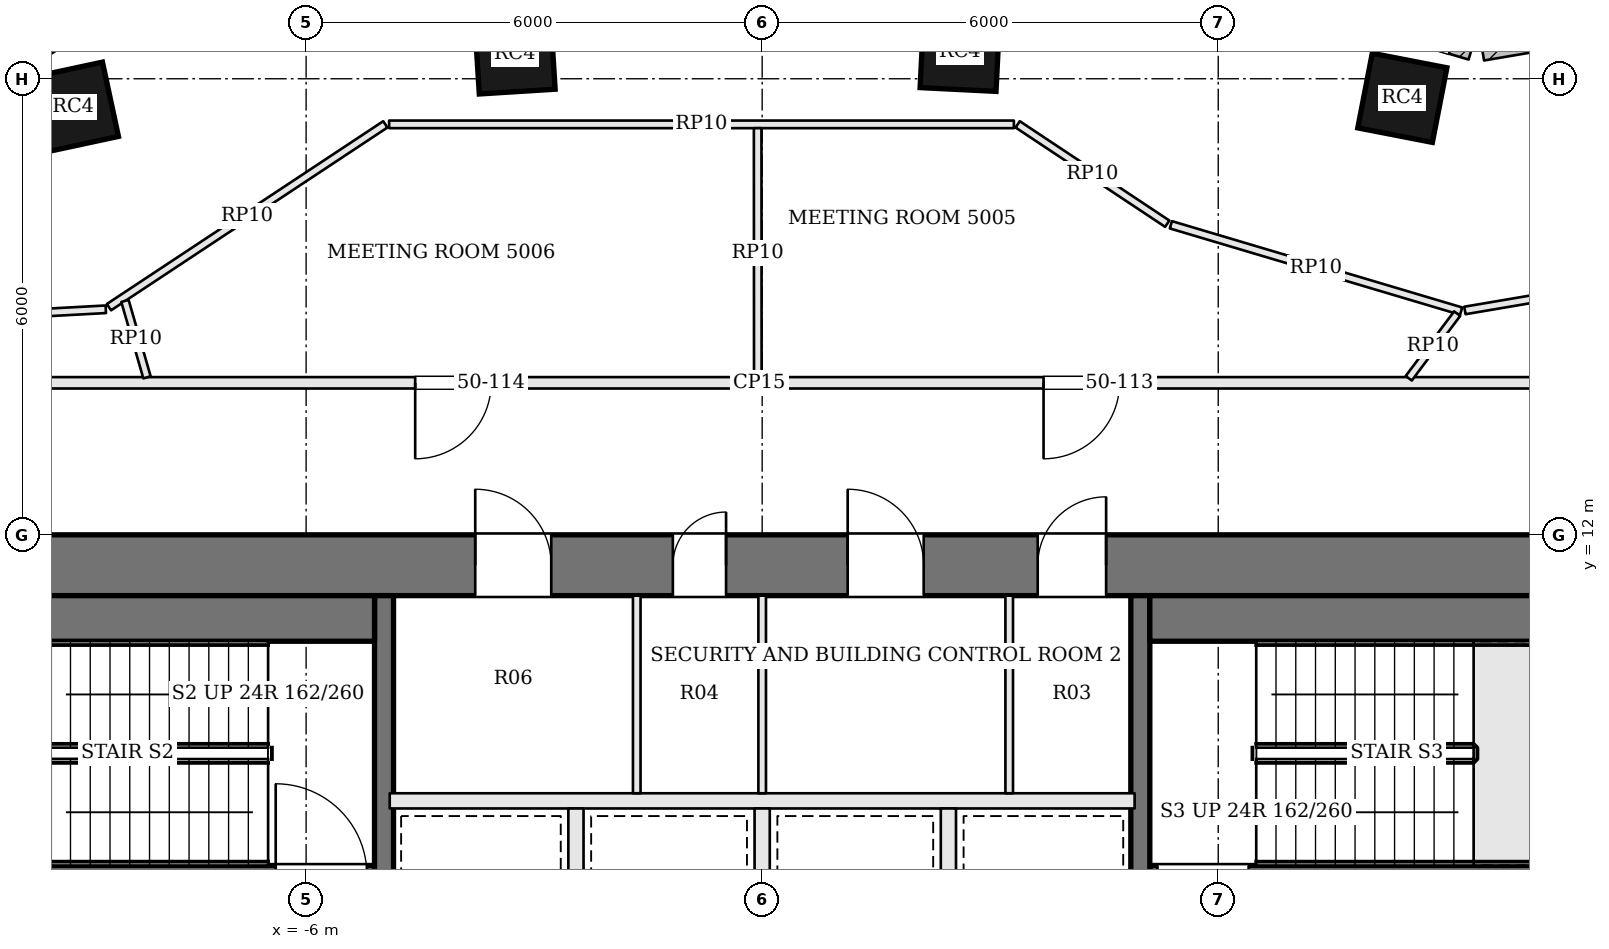
"""IFC4 building model, lengths in metres.
Left out: names, types, materials, properties, quantities, classifications, styles, units other than length and angle.
Written with IfcOpenShell. Run it as: python <this file> out.ifc"""

import sys

from ifc_helpers import new_model, si_unit, direction, frame, frame_2d, origin, origin_2d, place, context, subcontext, project, spatial, rectangle, extrude, element, fill, save


model = new_model("IFC4")
c1 = context("Model", 3, precision=1e-05, world=origin(), true_north=direction((0.0, 1.0)))
c2 = subcontext(c1, "Body", "Model", "MODEL_VIEW")
j1 = project(units=[si_unit("LENGTHUNIT", "METRE"), si_unit("PLANEANGLEUNIT", "RADIAN")], contexts=[c1])
p1 = place(None, origin())
s1 = spatial("IfcSite", under=j1, at=p1, CompositionType="ELEMENT")
p2 = place(p1, origin())
s2 = spatial("IfcBuilding", under=s1, at=p2, CompositionType="ELEMENT")
p3 = place(p2, frame((0.0, 0.0, 205.2)))
s3 = spatial("IfcBuildingStorey", under=s2, at=p3, CompositionType="ELEMENT", Elevation=205.2)
p4 = place(p3, frame((-13.0, 11.6, 0.0), z_axis=(0.0, 0.0, 1.0), x_axis=(1.0, 0.0, 0.0)))
e1 = element("IfcWall", 1, at=p4, inside=s3, PredefinedType="SHEAR", context=c2, shape_type="SweptSolid", body=[
    extrude(rectangle(XDim=26.0, YDim=0.8, at=frame_2d((13.0, 0.0))), origin(), (0.0, 0.0, 1.0), 3.9),
])
p5 = place(p4, frame((9.225, 0.0, 0.0)))
e2 = element("IfcOpeningElement", 2, at=p5, cuts=e1, PredefinedType="OPENING", context=c2, shape_type="SweptSolid", body=[
    extrude(rectangle(XDim=1.0, YDim=2.1, at=frame_2d((0.5, 1.05))), frame((0.0, 0.41, 0.0), z_axis=(0.0, -1.0, 0.0), x_axis=(1.0, 0.0, 0.0)), (0.0, 0.0, 1.0), 0.82),
])
p6 = place(p4, frame((11.825, 0.0, 0.0)))
e3 = element("IfcOpeningElement", 3, at=p6, cuts=e1, PredefinedType="OPENING", context=c2, shape_type="SweptSolid", body=[
    extrude(rectangle(XDim=0.7, YDim=2.1, at=frame_2d((0.35, 1.05))), frame((0.0, 0.41, 0.0), z_axis=(0.0, -1.0, 0.0), x_axis=(1.0, 0.0, 0.0)), (0.0, 0.0, 1.0), 0.82),
])
p7 = place(p4, frame((14.125, 0.0, 0.0)))
e4 = element("IfcOpeningElement", 4, at=p7, cuts=e1, PredefinedType="OPENING", context=c2, shape_type="SweptSolid", body=[
    extrude(rectangle(XDim=1.0, YDim=2.1, at=frame_2d((0.5, 1.05))), frame((0.0, 0.41, 0.0), z_axis=(0.0, -1.0, 0.0), x_axis=(1.0, 0.0, 0.0)), (0.0, 0.0, 1.0), 0.82),
])
p8 = place(p4, frame((16.625, 0.0, 0.0)))
e5 = element("IfcOpeningElement", 5, at=p8, cuts=e1, PredefinedType="OPENING", context=c2, shape_type="SweptSolid", body=[
    extrude(rectangle(XDim=0.9, YDim=2.1, at=frame_2d((0.45, 1.05))), frame((0.0, 0.41, 0.0), z_axis=(0.0, -1.0, 0.0), x_axis=(1.0, 0.0, 0.0)), (0.0, 0.0, 1.0), 0.82),
])
for number, where, z_axis, x_axis in (
    (6, (8.422, 17.749, 0.0), (0.0, 0.0, 1.0), (-0.982, 0.191, 0.0)),
    (7, (2.602, 18.358, 0.0), (0.0, 0.0, 1.0), (-0.999, 0.05, 0.0)),
    (8, (-3.254, 18.33, 0.0), (0.0, 0.0, 1.0), (-0.998, -0.063, 0.0)),
    (9, (-9.063, 17.625, 0.0), (0.0, 0.0, 1.0), (-0.978, -0.21, 0.0)),
):
    element("IfcColumn", number, at=place(p3, frame(where, z_axis=z_axis, x_axis=x_axis)), inside=s3, PredefinedType="COLUMN", context=c2, shape_type="SweptSolid", body=[
        extrude(rectangle(XDim=1.0, YDim=1.0, at=origin_2d()), origin(), (0.0, 0.0, 1.0), 3.9),
    ])
p9 = place(p3, frame((14.782, 19.367, 0.0), z_axis=(0.0, 0.0, 1.0), x_axis=(-0.98585584667, -0.167595493934, 0.0)))
e10 = element("IfcWall", 10, at=p9, inside=s3, PredefinedType="SOLIDWALL", context=c2, shape_type="SweptSolid", body=[
    extrude(rectangle(XDim=5.399, YDim=0.45, at=frame_2d((2.699, 0.0))), origin(), (0.0, 0.0, 1.0), 3.7),
])
p10 = place(p9, frame((1.649, 0.0, 0.9)))
e11 = element("IfcOpeningElement", 11, at=p10, cuts=e10, PredefinedType="OPENING", context=c2, shape_type="SweptSolid", body=[
    extrude(rectangle(XDim=2.1, YDim=2.3, at=frame_2d((1.05, 1.15))), frame((0.0, 0.235, 0.0), z_axis=(0.0, -1.0, 0.0), x_axis=(1.0, 0.0, 0.0)), (0.0, 0.0, 1.0), 0.47),
])
p11 = place(p3, frame((9.357, 18.469, 0.0), z_axis=(0.0, 0.0, 1.0), x_axis=(-0.958524054629, 0.285011643091, 0.0)))
e12 = element("IfcWall", 12, at=p11, inside=s3, PredefinedType="SOLIDWALL", context=c2, shape_type="SweptSolid", body=[
    extrude(rectangle(XDim=2.637, YDim=0.45, at=frame_2d((1.319, 0.0))), origin(), (0.0, 0.0, 1.0), 3.7),
])
p12 = place(p11, frame((0.269, 0.0, 0.9)))
e13 = element("IfcOpeningElement", 13, at=p12, cuts=e12, PredefinedType="OPENING", context=c2, shape_type="SweptSolid", body=[
    extrude(rectangle(XDim=2.1, YDim=2.3, at=frame_2d((1.05, 1.15))), frame((0.0, 0.235, 0.0), z_axis=(0.0, -1.0, 0.0), x_axis=(1.0, 0.0, 0.0)), (0.0, 0.0, 1.0), 0.47),
])
p13 = place(p3, frame((-6.568, 20.441, 0.0), z_axis=(0.0, 0.0, 1.0), x_axis=(-0.834034214531, -0.551712723246, 0.0)))
e14 = element("IfcWall", 14, at=p13, inside=s3, PredefinedType="SOLIDWALL", context=c2, shape_type="SweptSolid", body=[
    extrude(rectangle(XDim=3.757, YDim=0.45, at=frame_2d((1.879, 0.0))), origin(), (0.0, 0.0, 1.0), 3.7),
])
p14 = place(p13, frame((0.829, 0.0, 0.9)))
e15 = element("IfcOpeningElement", 15, at=p14, cuts=e14, PredefinedType="OPENING", context=c2, shape_type="SweptSolid", body=[
    extrude(rectangle(XDim=2.1, YDim=2.3, at=frame_2d((1.05, 1.15))), frame((0.0, 0.235, 0.0), z_axis=(0.0, -1.0, 0.0), x_axis=(1.0, 0.0, 0.0)), (0.0, 0.0, 1.0), 0.47),
])
p15 = place(p3, frame((12.2, 7.525, 0.0), z_axis=(0.0, 0.0, 1.0), x_axis=(-1.0, 0.0, 0.0)))
e16 = element("IfcWall", 16, at=p15, inside=s3, PredefinedType="SOLIDWALL", context=c2, shape_type="SweptSolid", body=[
    extrude(rectangle(XDim=7.1, YDim=0.25, at=frame_2d((3.55, 0.0))), origin(), (0.0, 0.0, 1.0), 3.7),
])
p16 = place(p15, frame((5.8, 0.0, 0.0)))
e17 = element("IfcOpeningElement", 17, at=p16, cuts=e16, PredefinedType="OPENING", context=c2, shape_type="SweptSolid", body=[
    extrude(rectangle(XDim=1.2, YDim=2.1, at=frame_2d((0.6, 1.05))), frame((0.0, 0.135, 0.0), z_axis=(0.0, -1.0, 0.0), x_axis=(1.0, 0.0, 0.0)), (0.0, 0.0, 1.0), 0.27),
])
p17 = place(p3, frame((-12.2, 7.525, 0.0), z_axis=(0.0, 0.0, 1.0), x_axis=(1.0, 0.0, 0.0)))
e18 = element("IfcWall", 18, at=p17, inside=s3, PredefinedType="SOLIDWALL", context=c2, shape_type="SweptSolid", body=[
    extrude(rectangle(XDim=7.1, YDim=0.25, at=frame_2d((3.55, 0.0))), origin(), (0.0, 0.0, 1.0), 3.7),
])
p18 = place(p17, frame((5.8, 0.0, 0.0)))
e19 = element("IfcOpeningElement", 19, at=p18, cuts=e18, PredefinedType="OPENING", context=c2, shape_type="SweptSolid", body=[
    extrude(rectangle(XDim=1.2, YDim=2.1, at=frame_2d((0.6, 1.05))), frame((0.0, 0.135, 0.0), z_axis=(0.0, -1.0, 0.0), x_axis=(1.0, 0.0, 0.0)), (0.0, 0.0, 1.0), 0.27),
])
p19 = place(p3, frame((-4.975, -2.2, 0.0), z_axis=(0.0, 0.0, 1.0), x_axis=(0.0, 1.0, 0.0)))
e20 = element("IfcWall", 20, at=p19, inside=s3, PredefinedType="SOLIDWALL", context=c2, shape_type="SweptSolid", body=[
    extrude(rectangle(XDim=13.4, YDim=0.25, at=frame_2d((6.7, 0.0))), origin(), (0.0, 0.0, 1.0), 3.7),
])
p20 = place(p19, frame((5.25, 0.0, 0.0)))
e21 = element("IfcOpeningElement", 21, at=p20, cuts=e20, PredefinedType="OPENING", context=c2, shape_type="SweptSolid", body=[
    extrude(rectangle(XDim=1.2, YDim=2.1, at=frame_2d((0.6, 1.05))), frame((0.0, 0.135, 0.0), z_axis=(0.0, -1.0, 0.0), x_axis=(1.0, 0.0, 0.0)), (0.0, 0.0, 1.0), 0.27),
])
p21 = place(p3, frame((4.975, 11.2, 0.0), z_axis=(0.0, 0.0, 1.0), x_axis=(0.0, -1.0, 0.0)))
e22 = element("IfcWall", 22, at=p21, inside=s3, PredefinedType="SOLIDWALL", context=c2, shape_type="SweptSolid", body=[
    extrude(rectangle(XDim=13.4, YDim=0.25, at=frame_2d((6.7, 0.0))), origin(), (0.0, 0.0, 1.0), 3.7),
])
p22 = place(p21, frame((5.25, 0.0, 0.0)))
e23 = element("IfcOpeningElement", 23, at=p22, cuts=e22, PredefinedType="OPENING", context=c2, shape_type="SweptSolid", body=[
    extrude(rectangle(XDim=1.2, YDim=2.1, at=frame_2d((0.6, 1.05))), frame((0.0, 0.135, 0.0), z_axis=(0.0, -1.0, 0.0), x_axis=(1.0, 0.0, 0.0)), (0.0, 0.0, 1.0), 0.27),
])
for number, where, z_axis, x_axis in (
    (24, (-12.2, 10.9, 0.0), (0.0, 0.0, 1.0), (1.0, 0.0, 0.0)),
    (25, (12.2, 10.9, 0.0), (0.0, 0.0, 1.0), (-1.0, 0.0, 0.0)),
):
    element("IfcWall", number, at=place(p3, frame(where, z_axis=z_axis, x_axis=x_axis)), inside=s3, PredefinedType="SOLIDWALL", context=c2, shape_type="SweptSolid", body=[
        extrude(rectangle(XDim=7.1, YDim=0.6, at=frame_2d((3.55, 0.0))), origin(), (0.0, 0.0, 1.0), 3.7),
    ])
p23 = place(p3, frame((-4.9, 8.5, 0.0), z_axis=(0.0, 0.0, 1.0), x_axis=(1.0, 0.0, 0.0)))
e26 = element("IfcWall", 26, at=p23, inside=s3, PredefinedType="SOLIDWALL", context=c2, shape_type="SweptSolid", body=[
    extrude(rectangle(XDim=9.8, YDim=0.2, at=frame_2d((4.9, 0.0))), origin(), (0.0, 0.0, 1.0), 3.7),
])
for number, where, z_axis, x_axis in (
    (27, (-2.45, 6.2, 0.0), (0.0, 0.0, 1.0), (0.0, 1.0, 0.0)),
    (28, (0.0, 6.2, 0.0), (0.0, 0.0, 1.0), (0.0, 1.0, 0.0)),
    (29, (2.45, 6.2, 0.0), (0.0, 0.0, 1.0), (0.0, 1.0, 0.0)),
):
    element("IfcWall", number, at=place(p3, frame(where, z_axis=z_axis, x_axis=x_axis)), inside=s3, PredefinedType="SOLIDWALL", context=c2, shape_type="SweptSolid", body=[
        extrude(rectangle(XDim=2.2, YDim=0.2, at=frame_2d((1.1, 0.0))), origin(), (0.0, 0.0, 1.0), 3.7),
    ])
for number, where, z_axis, x_axis in (
    (30, (-1.65, 8.6, 0.0), (0.0, 0.0, 1.0), (0.0, 1.0, 0.0)),
    (31, (0.0, 8.6, 0.0), (0.0, 0.0, 1.0), (0.0, 1.0, 0.0)),
    (32, (3.25, 8.6, 0.0), (0.0, 0.0, 1.0), (0.0, 1.0, 0.0)),
):
    element("IfcWall", number, at=place(p3, frame(where, z_axis=z_axis, x_axis=x_axis)), inside=s3, PredefinedType="PARTITIONING", context=c2, shape_type="SweptSolid", body=[
        extrude(rectangle(XDim=2.6, YDim=0.1, at=frame_2d((1.3, 0.0))), origin(), (0.0, 0.0, 1.0), 3.7),
    ])
p24 = place(p3, frame((14.925, 14.0, 0.0), z_axis=(0.0, 0.0, 1.0), x_axis=(-1.0, 0.0, 0.0)))
e33 = element("IfcWall", 33, at=p24, inside=s3, PredefinedType="PARTITIONING", context=c2, shape_type="SweptSolid", body=[
    extrude(rectangle(XDim=29.925, YDim=0.15, at=frame_2d((14.962, 0.0))), origin(), (0.0, 0.0, 1.0), 3.084),
])
p25 = place(p24, frame((1.699, 0.0, 0.0)))
e34 = element("IfcOpeningElement", 34, at=p25, cuts=e33, PredefinedType="OPENING", context=c2, shape_type="SweptSolid", body=[
    extrude(rectangle(XDim=1.0, YDim=2.4, at=frame_2d((0.5, 1.2))), frame((0.0, 0.085, 0.0), z_axis=(0.0, -1.0, 0.0), x_axis=(1.0, 0.0, 0.0)), (0.0, 0.0, 1.0), 0.17),
])
p26 = place(p24, frame((10.223, 0.0, 0.0)))
e35 = element("IfcOpeningElement", 35, at=p26, cuts=e33, PredefinedType="OPENING", context=c2, shape_type="SweptSolid", body=[
    extrude(rectangle(XDim=1.0, YDim=2.4, at=frame_2d((0.5, 1.2))), frame((0.0, 0.085, 0.0), z_axis=(0.0, -1.0, 0.0), x_axis=(1.0, 0.0, 0.0)), (0.0, 0.0, 1.0), 0.17),
])
p27 = place(p24, frame((18.49, 0.0, 0.0)))
e36 = element("IfcOpeningElement", 36, at=p27, cuts=e33, PredefinedType="OPENING", context=c2, shape_type="SweptSolid", body=[
    extrude(rectangle(XDim=1.0, YDim=2.4, at=frame_2d((0.5, 1.2))), frame((0.0, 0.085, 0.0), z_axis=(0.0, -1.0, 0.0), x_axis=(1.0, 0.0, 0.0)), (0.0, 0.0, 1.0), 0.17),
])
p28 = place(p3, frame((3.362, 17.4, 0.0), z_axis=(0.0, 0.0, 1.0), x_axis=(0.832987305186, -0.553292101335, 0.0)))
e37 = element("IfcWall", 37, at=p28, inside=s3, PredefinedType="PARTITIONING", context=c2, shape_type="SweptSolid", body=[
    extrude(rectangle(XDim=2.362, YDim=0.1, at=frame_2d((1.181, 0.0))), origin(), (0.0, 0.0, 1.0), 3.084),
])
p29 = place(p3, frame((5.377, 16.079, 0.0), z_axis=(0.0, 0.0, 1.0), x_axis=(0.958503323659, -0.28508135424, 0.0)))
e38 = element("IfcWall", 38, at=p29, inside=s3, PredefinedType="PARTITIONING", context=c2, shape_type="SweptSolid", body=[
    extrude(rectangle(XDim=3.984, YDim=0.1, at=frame_2d((1.992, 0.0))), origin(), (0.0, 0.0, 1.0), 3.084),
])
p30 = place(p3, frame((9.245, 14.952, 0.0), z_axis=(0.0, 0.0, 1.0), x_axis=(0.985863233989, 0.167552033319, 0.0)))
e39 = element("IfcWall", 39, at=p30, inside=s3, PredefinedType="PARTITIONING", context=c2, shape_type="SweptSolid", body=[
    extrude(rectangle(XDim=4.531, YDim=0.1, at=frame_2d((2.266, 0.0))), origin(), (0.0, 0.0, 1.0), 3.084),
])
p31 = place(p3, frame((-13.437, 14.706, 0.0), z_axis=(0.0, 0.0, 1.0), x_axis=(0.998525882111, 0.054277645072, 0.0)))
e40 = element("IfcWall", 40, at=p31, inside=s3, PredefinedType="PARTITIONING", context=c2, shape_type="SweptSolid", body=[
    extrude(rectangle(XDim=4.808, YDim=0.1, at=frame_2d((2.404, 0.0))), origin(), (0.0, 0.0, 1.0), 3.084),
])
p32 = place(p31, frame((0.5, 0.0, 0.0)))
e41 = element("IfcOpeningElement", 41, at=p32, cuts=e40, PredefinedType="OPENING", context=c2, shape_type="SweptSolid", body=[
    extrude(rectangle(XDim=0.9, YDim=2.1, at=frame_2d((0.45, 1.05))), frame((0.0, 0.06, 0.0), z_axis=(0.0, -1.0, 0.0), x_axis=(1.0, 0.0, 0.0)), (0.0, 0.0, 1.0), 0.12),
])
p33 = place(p3, frame((-8.594, 14.995, 0.0), z_axis=(0.0, 0.0, 1.0), x_axis=(0.834061061321, 0.551672136316, 0.0)))
e42 = element("IfcWall", 42, at=p33, inside=s3, PredefinedType="PARTITIONING", context=c2, shape_type="SweptSolid", body=[
    extrude(rectangle(XDim=4.359, YDim=0.1, at=frame_2d((2.18, 0.0))), origin(), (0.0, 0.0, 1.0), 3.084),
])
p34 = place(p3, frame((-4.908, 17.4, 0.0), z_axis=(0.0, 0.0, 1.0), x_axis=(1.0, 0.0, 0.0)))
e43 = element("IfcWall", 43, at=p34, inside=s3, PredefinedType="PARTITIONING", context=c2, shape_type="SweptSolid", body=[
    extrude(rectangle(XDim=8.219, YDim=0.1, at=frame_2d((4.11, 0.0))), origin(), (0.0, 0.0, 1.0), 3.084),
])
p35 = place(p3, frame((8.507, 14.06, 0.0), z_axis=(0.0, 0.0, 1.0), x_axis=(0.599742509515, 0.800193053132, 0.0)))
e44 = element("IfcWall", 44, at=p35, inside=s3, PredefinedType="PARTITIONING", context=c2, shape_type="SweptSolid", body=[
    extrude(rectangle(XDim=1.062, YDim=0.1, at=frame_2d((0.531, 0.0))), origin(), (0.0, 0.0, 1.0), 3.084),
])
p36 = place(p3, frame((-0.057, 14.075, 0.0), z_axis=(0.0, 0.0, 1.0), x_axis=(-0.000596347266, 0.999999822185, 0.0)))
e45 = element("IfcWall", 45, at=p36, inside=s3, PredefinedType="PARTITIONING", context=c2, shape_type="SweptSolid", body=[
    extrude(rectangle(XDim=3.275, YDim=0.1, at=frame_2d((1.638, 0.0))), origin(), (0.0, 0.0, 1.0), 3.084),
])
p37 = place(p3, frame((-8.094, 14.072, 0.0), z_axis=(0.0, 0.0, 1.0), x_axis=(-0.27703220146, 0.96086063472, 0.0)))
e46 = element("IfcWall", 46, at=p37, inside=s3, PredefinedType="PARTITIONING", context=c2, shape_type="SweptSolid", body=[
    extrude(rectangle(XDim=1.046, YDim=0.1, at=frame_2d((0.523, 0.0))), origin(), (0.0, 0.0, 1.0), 3.084),
])
p38 = place(p5, origin())
e47 = element("IfcDoor", 47, at=p38, inside=s3, OperationType="SINGLE_SWING_LEFT", PredefinedType="DOOR", context=c2, shape_type="SweptSolid", body=[
    extrude(rectangle(XDim=1.0, YDim=2.1, at=frame_2d((0.5, 1.05))), frame((0.0, 0.025, 0.0), z_axis=(0.0, -1.0, 0.0), x_axis=(1.0, 0.0, 0.0)), (0.0, 0.0, 1.0), 0.05),
])
fill(e2, e47)
p39 = place(p6, origin())
e48 = element("IfcDoor", 48, at=p39, inside=s3, OperationType="SINGLE_SWING_RIGHT", PredefinedType="DOOR", context=c2, shape_type="SweptSolid", body=[
    extrude(rectangle(XDim=0.7, YDim=2.1, at=frame_2d((0.35, 1.05))), frame((0.0, 0.025, 0.0), z_axis=(0.0, -1.0, 0.0), x_axis=(1.0, 0.0, 0.0)), (0.0, 0.0, 1.0), 0.05),
])
fill(e3, e48)
p40 = place(p7, origin())
e49 = element("IfcDoor", 49, at=p40, inside=s3, OperationType="SINGLE_SWING_LEFT", PredefinedType="DOOR", context=c2, shape_type="SweptSolid", body=[
    extrude(rectangle(XDim=1.0, YDim=2.1, at=frame_2d((0.5, 1.05))), frame((0.0, 0.025, 0.0), z_axis=(0.0, -1.0, 0.0), x_axis=(1.0, 0.0, 0.0)), (0.0, 0.0, 1.0), 0.05),
])
fill(e4, e49)
p41 = place(p8, origin())
e50 = element("IfcDoor", 50, at=p41, inside=s3, OperationType="SINGLE_SWING_RIGHT", PredefinedType="DOOR", context=c2, shape_type="SweptSolid", body=[
    extrude(rectangle(XDim=0.9, YDim=2.1, at=frame_2d((0.45, 1.05))), frame((0.0, 0.025, 0.0), z_axis=(0.0, -1.0, 0.0), x_axis=(1.0, 0.0, 0.0)), (0.0, 0.0, 1.0), 0.05),
])
fill(e5, e50)
p42 = place(p26, origin())
e51 = element("IfcDoor", 51, at=p42, inside=s3, OperationType="SINGLE_SWING_RIGHT", PredefinedType="DOOR", context=c2, shape_type="SweptSolid", body=[
    extrude(rectangle(XDim=1.0, YDim=2.4, at=frame_2d((0.5, 1.2))), frame((0.0, 0.025, 0.0), z_axis=(0.0, -1.0, 0.0), x_axis=(1.0, 0.0, 0.0)), (0.0, 0.0, 1.0), 0.05),
])
fill(e35, e51)
p43 = place(p27, origin())
e52 = element("IfcDoor", 52, at=p43, inside=s3, OperationType="SINGLE_SWING_RIGHT", PredefinedType="DOOR", context=c2, shape_type="SweptSolid", body=[
    extrude(rectangle(XDim=1.0, YDim=2.4, at=frame_2d((0.5, 1.2))), frame((0.0, 0.025, 0.0), z_axis=(0.0, -1.0, 0.0), x_axis=(1.0, 0.0, 0.0)), (0.0, 0.0, 1.0), 0.05),
])
fill(e36, e52)
save(model, sys.argv[1])
